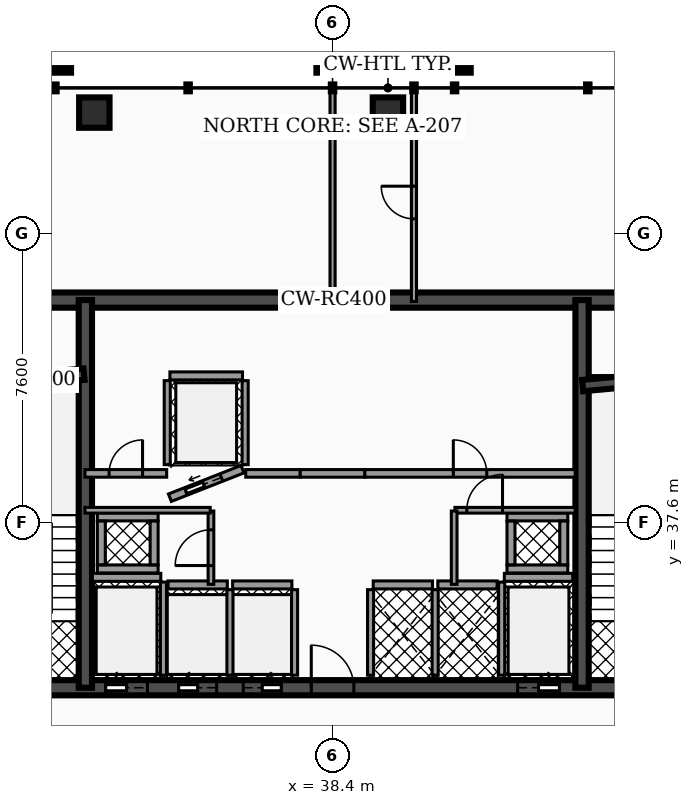
"""IFC4 building model, lengths in metres.
Left out: names, types, materials, properties, quantities, classifications, styles, units other than length and angle.
Written with IfcOpenShell. Run it as: python <this file> out.ifc"""

import sys

from ifc_helpers import new_model, si_unit, direction, frame, frame_2d, origin, origin_2d, place, context, subcontext, project, spatial, rectangle, hollow_rectangle, extrude, element, fill, save


model = new_model("IFC4")
c1 = context("Model", 3, precision=1e-05, world=origin(), true_north=direction((0.0, 1.0)))
c2 = subcontext(c1, "Body", "Model", "MODEL_VIEW")
j1 = project(units=[si_unit("LENGTHUNIT", "METRE"), si_unit("PLANEANGLEUNIT", "RADIAN")], contexts=[c1])
p1 = place(None, origin())
s1 = spatial("IfcSite", under=j1, at=p1, CompositionType="ELEMENT")
p2 = place(p1, origin())
s2 = spatial("IfcBuilding", under=s1, at=p2, CompositionType="ELEMENT")
p3 = place(p2, frame((0.0, 0.0, 153.34)))
s3 = spatial("IfcBuildingStorey", under=s2, at=p3, CompositionType="ELEMENT", Elevation=153.34)
p4 = place(p3, frame((28.4, 43.45, 0.0), z_axis=(0.0, 0.0, 1.0), x_axis=(1.0, 0.0, 0.0)))
e1 = element("IfcWall", 1, at=p4, inside=s3, PredefinedType="SHEAR", context=c2, shape_type="SweptSolid", body=[
    extrude(rectangle(XDim=20.06, YDim=0.4, at=frame_2d((10.03, 0.0))), origin(), (0.0, 0.0, 1.0), 3.5),
])
p5 = place(p3, frame((28.4, 33.25, 0.0), z_axis=(0.0, 0.0, 1.0), x_axis=(1.0, 0.0, 0.0)))
e2 = element("IfcWall", 2, at=p5, inside=s3, PredefinedType="SHEAR", context=c2, shape_type="SweptSolid", body=[
    extrude(rectangle(XDim=20.06, YDim=0.4, at=frame_2d((10.03, 0.0))), origin(), (0.0, 0.0, 1.0), 3.5),
])
p6 = place(p5, frame((4.03, 0.0, 0.0)))
e3 = element("IfcOpeningElement", 3, at=p6, cuts=e2, PredefinedType="OPENING", context=c2, shape_type="SweptSolid", body=[
    extrude(rectangle(XDim=1.1, YDim=2.15, at=frame_2d((0.55, 1.075))), frame((0.0, 0.21, 0.0), z_axis=(0.0, -1.0, 0.0), x_axis=(1.0, 0.0, 0.0)), (0.0, 0.0, 1.0), 0.42),
])
p7 = place(p5, frame((14.87, 0.0, 0.0)))
e4 = element("IfcOpeningElement", 4, at=p7, cuts=e2, PredefinedType="OPENING", context=c2, shape_type="SweptSolid", body=[
    extrude(rectangle(XDim=1.1, YDim=2.15, at=frame_2d((0.55, 1.075))), frame((0.0, 0.21, 0.0), z_axis=(0.0, -1.0, 0.0), x_axis=(1.0, 0.0, 0.0)), (0.0, 0.0, 1.0), 0.42),
])
p8 = place(p5, frame((5.95, 0.0, 0.0)))
e5 = element("IfcOpeningElement", 5, at=p8, cuts=e2, PredefinedType="OPENING", context=c2, shape_type="SweptSolid", body=[
    extrude(rectangle(XDim=1.0, YDim=2.1, at=frame_2d((0.5, 1.05))), frame((0.0, 0.21, 0.0), z_axis=(0.0, -1.0, 0.0), x_axis=(1.0, 0.0, 0.0)), (0.0, 0.0, 1.0), 0.42),
])
p9 = place(p5, frame((7.65, 0.0, 0.0)))
e6 = element("IfcOpeningElement", 6, at=p9, cuts=e2, PredefinedType="OPENING", context=c2, shape_type="SweptSolid", body=[
    extrude(rectangle(XDim=1.0, YDim=2.1, at=frame_2d((0.5, 1.05))), frame((0.0, 0.21, 0.0), z_axis=(0.0, -1.0, 0.0), x_axis=(1.0, 0.0, 0.0)), (0.0, 0.0, 1.0), 0.42),
])
p10 = place(p5, frame((1.31, 0.0, 0.0)))
e7 = element("IfcOpeningElement", 7, at=p10, cuts=e2, PredefinedType="OPENING", context=c2, shape_type="SweptSolid", body=[
    extrude(rectangle(XDim=1.1, YDim=2.2, at=frame_2d((0.55, 1.1))), frame((0.0, 0.21, 0.0), z_axis=(0.0, -1.0, 0.0), x_axis=(1.0, 0.0, 0.0)), (0.0, 0.0, 1.0), 0.42),
])
p11 = place(p5, frame((9.44, 0.0, 0.0)))
e8 = element("IfcOpeningElement", 8, at=p11, cuts=e2, PredefinedType="OPENING", context=c2, shape_type="SweptSolid", body=[
    extrude(rectangle(XDim=1.12, YDim=2.05, at=frame_2d((0.56, 1.025))), frame((0.0, 0.21, 0.0), z_axis=(0.0, -1.0, 0.0), x_axis=(1.0, 0.0, 0.0)), (0.0, 0.0, 1.0), 0.42),
])
p12 = place(p5, frame((17.65, 0.0, 0.0)))
e9 = element("IfcOpeningElement", 9, at=p12, cuts=e2, PredefinedType="OPENING", context=c2, shape_type="SweptSolid", body=[
    extrude(rectangle(XDim=1.1, YDim=2.2, at=frame_2d((0.55, 1.1))), frame((0.0, 0.21, 0.0), z_axis=(0.0, -1.0, 0.0), x_axis=(1.0, 0.0, 0.0)), (0.0, 0.0, 1.0), 0.42),
])
for number, where, z_axis, x_axis in (
    (10, (31.895, 33.25, 0.0), (0.0, 0.0, 1.0), (0.0, 1.0, 0.0)),
    (11, (44.965, 33.25, 0.0), (0.0, 0.0, 1.0), (0.0, 1.0, 0.0)),
):
    element("IfcWall", number, at=place(p3, frame(where, z_axis=z_axis, x_axis=x_axis)), inside=s3, PredefinedType="SHEAR", context=c2, shape_type="SweptSolid", body=[
        extrude(rectangle(XDim=10.2, YDim=0.35, at=frame_2d((5.1, 0.0))), origin(), (0.0, 0.0, 1.0), 3.5),
    ])
p13 = place(p3, frame((28.64, 41.2, 0.0), z_axis=(0.0, 0.0, 1.0), x_axis=(0.995687118776, 0.092774789157, 0.0)))
e12 = element("IfcWall", 12, at=p13, inside=s3, PredefinedType="SHEAR", context=c2, shape_type="SweptSolid", body=[
    extrude(rectangle(XDim=3.234, YDim=0.3, at=frame_2d((1.617, 0.0))), origin(), (0.0, 0.0, 1.0), 3.5),
])
p14 = place(p3, frame((44.98, 41.2, 0.0), z_axis=(0.0, 0.0, 1.0), x_axis=(0.995686468965, 0.09278176286, 0.0)))
e13 = element("IfcWall", 13, at=p14, inside=s3, PredefinedType="SHEAR", context=c2, shape_type="SweptSolid", body=[
    extrude(rectangle(XDim=3.234, YDim=0.3, at=frame_2d((1.617, 0.0))), origin(), (0.0, 0.0, 1.0), 3.5),
])
p15 = place(p3, frame((39.857, 48.383, 0.0), z_axis=(-0.007830290744, -0.033418562283, 0.999410769525), x_axis=(0.973630450451, -0.228130984206, 0.0)))
e14 = element("IfcColumn", 14, at=p15, inside=s3, PredefinedType="COLUMN", context=c2, shape_type="SweptSolid", body=[
    extrude(hollow_rectangle(XDim=0.8, YDim=0.8, WallThickness=0.04, at=origin_2d()), origin(), (0.0, 0.0, 1.0), 3.492),
])
p16 = place(p3, frame((32.131, 48.383, 0.0), z_axis=(-0.073422265468, -0.033329385464, 0.996743860276), x_axis=(0.413346829645, -0.910573664468, 0.0)))
e15 = element("IfcColumn", 15, at=p16, inside=s3, PredefinedType="COLUMN", context=c2, shape_type="SweptSolid", body=[
    extrude(hollow_rectangle(XDim=0.8, YDim=0.8, WallThickness=0.04, at=origin_2d()), origin(), (0.0, 0.0, 1.0), 3.501),
])
p17 = place(p3, frame((32.08, 36.155, 0.0), z_axis=(0.0, 0.0, 1.0), x_axis=(1.0, 0.0, 0.0)))
e16 = element("IfcWall", 16, at=p17, inside=s3, PredefinedType="SOLIDWALL", context=c2, shape_type="SweptSolid", body=[
    extrude(rectangle(XDim=1.8, YDim=0.21, at=frame_2d((0.9, 0.0))), origin(), (0.0, 0.0, 1.0), 2.472),
])
p18 = place(p3, frame((33.95, 33.58, 0.0), z_axis=(0.0, 0.0, 1.0), x_axis=(0.0, 1.0, 0.0)))
e17 = element("IfcWall", 17, at=p18, inside=s3, PredefinedType="SOLIDWALL", context=c2, shape_type="SweptSolid", body=[
    extrude(rectangle(XDim=2.45, YDim=0.16, at=frame_2d((1.225, 0.0))), origin(), (0.0, 0.0, 1.0), 2.472),
])
p19 = place(p3, frame((42.92, 36.155, 0.0), z_axis=(0.0, 0.0, 1.0), x_axis=(1.0, 0.0, 0.0)))
e18 = element("IfcWall", 18, at=p19, inside=s3, PredefinedType="SOLIDWALL", context=c2, shape_type="SweptSolid", body=[
    extrude(rectangle(XDim=1.8, YDim=0.21, at=frame_2d((0.9, 0.0))), origin(), (0.0, 0.0, 1.0), 2.472),
])
p20 = place(p3, frame((42.85, 33.58, 0.0), z_axis=(0.0, 0.0, 1.0), x_axis=(0.0, 1.0, 0.0)))
e19 = element("IfcWall", 19, at=p20, inside=s3, PredefinedType="SOLIDWALL", context=c2, shape_type="SweptSolid", body=[
    extrude(rectangle(XDim=2.45, YDim=0.16, at=frame_2d((1.225, 0.0))), origin(), (0.0, 0.0, 1.0), 2.472),
])
p21 = place(p3, frame((34.07, 35.955, 0.0), z_axis=(0.0, 0.0, 1.0), x_axis=(1.0, 0.0, 0.0)))
e20 = element("IfcWall", 20, at=p21, inside=s3, PredefinedType="SOLIDWALL", context=c2, shape_type="SweptSolid", body=[
    extrude(rectangle(XDim=1.56, YDim=0.21, at=frame_2d((0.78, 0.0))), origin(), (0.0, 0.0, 1.0), 2.472),
])
p22 = place(p3, frame((35.7, 33.58, 0.0), z_axis=(0.0, 0.0, 1.0), x_axis=(0.0, 1.0, 0.0)))
e21 = element("IfcWall", 21, at=p22, inside=s3, PredefinedType="SOLIDWALL", context=c2, shape_type="SweptSolid", body=[
    extrude(rectangle(XDim=2.25, YDim=0.16, at=frame_2d((1.125, 0.0))), origin(), (0.0, 0.0, 1.0), 2.472),
])
p23 = place(p3, frame((35.77, 35.955, 0.0), z_axis=(0.0, 0.0, 1.0), x_axis=(1.0, 0.0, 0.0)))
e22 = element("IfcWall", 22, at=p23, inside=s3, PredefinedType="SOLIDWALL", context=c2, shape_type="SweptSolid", body=[
    extrude(rectangle(XDim=1.56, YDim=0.21, at=frame_2d((0.78, 0.0))), origin(), (0.0, 0.0, 1.0), 2.472),
])
p24 = place(p3, frame((37.4, 33.58, 0.0), z_axis=(0.0, 0.0, 1.0), x_axis=(0.0, 1.0, 0.0)))
e23 = element("IfcWall", 23, at=p24, inside=s3, PredefinedType="SOLIDWALL", context=c2, shape_type="SweptSolid", body=[
    extrude(rectangle(XDim=2.25, YDim=0.16, at=frame_2d((1.125, 0.0))), origin(), (0.0, 0.0, 1.0), 2.472),
])
p25 = place(p3, frame((34.12, 38.25, 0.0), z_axis=(0.0, 0.0, 1.0), x_axis=(0.930804993012, 0.36551616241, 0.0)))
e24 = element("IfcWall", 24, at=p25, inside=s3, PredefinedType="SOLIDWALL", context=c2, shape_type="SweptSolid", body=[
    extrude(rectangle(XDim=2.052, YDim=0.21, at=frame_2d((1.026, 0.0))), origin(), (0.0, 0.0, 1.0), 2.472),
])
p26 = place(p25, frame((0.455, 0.0, 0.0)))
e25 = element("IfcOpeningElement", 25, at=p26, cuts=e24, PredefinedType="OPENING", context=c2, shape_type="SweptSolid", body=[
    extrude(rectangle(XDim=1.0, YDim=2.1, at=frame_2d((0.5, 1.05))), frame((0.0, 0.115, 0.0), z_axis=(0.0, -1.0, 0.0), x_axis=(1.0, 0.0, 0.0)), (0.0, 0.0, 1.0), 0.23),
])
p27 = place(p3, frame((34.12, 41.455, 0.0), z_axis=(0.0, 0.0, 1.0), x_axis=(1.0, 0.0, 0.0)))
e26 = element("IfcWall", 26, at=p27, inside=s3, PredefinedType="SOLIDWALL", context=c2, shape_type="SweptSolid", body=[
    extrude(rectangle(XDim=1.91, YDim=0.21, at=frame_2d((0.955, 0.0))), origin(), (0.0, 0.0, 1.0), 2.472),
])
for number, where, z_axis, x_axis in (
    (27, (34.05, 39.12, 0.0), (0.0, 0.0, 1.0), (0.0, 1.0, 0.0)),
    (28, (36.1, 39.12, 0.0), (0.0, 0.0, 1.0), (0.0, 1.0, 0.0)),
):
    element("IfcWall", number, at=place(p3, frame(where, z_axis=z_axis, x_axis=x_axis)), inside=s3, PredefinedType="SOLIDWALL", context=c2, shape_type="SweptSolid", body=[
        extrude(rectangle(XDim=2.21, YDim=0.16, at=frame_2d((1.105, 0.0))), origin(), (0.0, 0.0, 1.0), 2.472),
    ])
p28 = place(p3, frame((39.47, 35.955, 0.0), z_axis=(0.0, 0.0, 1.0), x_axis=(1.0, 0.0, 0.0)))
e29 = element("IfcWall", 29, at=p28, inside=s3, PredefinedType="SOLIDWALL", context=c2, shape_type="SweptSolid", body=[
    extrude(rectangle(XDim=1.56, YDim=0.21, at=frame_2d((0.78, 0.0))), origin(), (0.0, 0.0, 1.0), 2.472),
])
for number, where, z_axis, x_axis in (
    (30, (39.4, 33.58, 0.0), (0.0, 0.0, 1.0), (0.0, 1.0, 0.0)),
    (31, (41.1, 33.58, 0.0), (0.0, 0.0, 1.0), (0.0, 1.0, 0.0)),
):
    element("IfcWall", number, at=place(p3, frame(where, z_axis=z_axis, x_axis=x_axis)), inside=s3, PredefinedType="SOLIDWALL", context=c2, shape_type="SweptSolid", body=[
        extrude(rectangle(XDim=2.25, YDim=0.16, at=frame_2d((1.125, 0.0))), origin(), (0.0, 0.0, 1.0), 2.472),
    ])
p29 = place(p3, frame((41.17, 35.955, 0.0), z_axis=(0.0, 0.0, 1.0), x_axis=(1.0, 0.0, 0.0)))
e32 = element("IfcWall", 32, at=p29, inside=s3, PredefinedType="SOLIDWALL", context=c2, shape_type="SweptSolid", body=[
    extrude(rectangle(XDim=1.56, YDim=0.21, at=frame_2d((0.78, 0.0))), origin(), (0.0, 0.0, 1.0), 2.472),
])
for number, where, z_axis, x_axis in (
    (33, (32.21, 36.375, 0.0), (0.0, 0.0, 1.0), (1.0, 0.0, 0.0)),
    (34, (32.21, 37.745, 0.0), (0.0, 0.0, 1.0), (1.0, 0.0, 0.0)),
):
    element("IfcWall", number, at=place(p3, frame(where, z_axis=z_axis, x_axis=x_axis)), inside=s3, PredefinedType="SOLIDWALL", context=c2, shape_type="SweptSolid", body=[
        extrude(rectangle(XDim=1.6, YDim=0.21, at=frame_2d((0.8, 0.0))), origin(), (0.0, 0.0, 1.0), 3.5),
    ])
for number, where, z_axis, x_axis in (
    (35, (32.315, 36.485, 0.0), (0.0, 0.0, 1.0), (0.0, 1.0, 0.0)),
    (36, (33.705, 36.485, 0.0), (0.0, 0.0, 1.0), (0.0, 1.0, 0.0)),
):
    element("IfcWall", number, at=place(p3, frame(where, z_axis=z_axis, x_axis=x_axis)), inside=s3, PredefinedType="SOLIDWALL", context=c2, shape_type="SweptSolid", body=[
        extrude(rectangle(XDim=1.15, YDim=0.21, at=frame_2d((0.575, 0.0))), origin(), (0.0, 0.0, 1.0), 3.5),
    ])
for number, where, z_axis, x_axis in (
    (37, (42.99, 36.375, 0.0), (0.0, 0.0, 1.0), (1.0, 0.0, 0.0)),
    (38, (42.99, 37.745, 0.0), (0.0, 0.0, 1.0), (1.0, 0.0, 0.0)),
):
    element("IfcWall", number, at=place(p3, frame(where, z_axis=z_axis, x_axis=x_axis)), inside=s3, PredefinedType="SOLIDWALL", context=c2, shape_type="SweptSolid", body=[
        extrude(rectangle(XDim=1.6, YDim=0.21, at=frame_2d((0.8, 0.0))), origin(), (0.0, 0.0, 1.0), 3.5),
    ])
for number, where, z_axis, x_axis in (
    (39, (43.095, 36.485, 0.0), (0.0, 0.0, 1.0), (0.0, 1.0, 0.0)),
    (40, (44.485, 36.485, 0.0), (0.0, 0.0, 1.0), (0.0, 1.0, 0.0)),
):
    element("IfcWall", number, at=place(p3, frame(where, z_axis=z_axis, x_axis=x_axis)), inside=s3, PredefinedType="SOLIDWALL", context=c2, shape_type="SweptSolid", body=[
        extrude(rectangle(XDim=1.15, YDim=0.21, at=frame_2d((0.575, 0.0))), origin(), (0.0, 0.0, 1.0), 3.5),
    ])
p30 = place(p3, frame((35.2, 35.97, 0.0), z_axis=(0.0, 0.0, 1.0), x_axis=(0.0, 1.0, 0.0)))
e41 = element("IfcWall", 41, at=p30, inside=s3, PredefinedType="PARTITIONING", context=c2, shape_type="SweptSolid", body=[
    extrude(rectangle(XDim=1.93, YDim=0.15, at=frame_2d((0.965, 0.0))), origin(), (0.0, 0.0, 1.0), 2.447),
])
p31 = place(p30, frame((0.495, 0.0, 0.0)))
e42 = element("IfcOpeningElement", 42, at=p31, cuts=e41, PredefinedType="OPENING", context=c2, shape_type="SweptSolid", body=[
    extrude(rectangle(XDim=0.94, YDim=2.05, at=frame_2d((0.47, 1.025))), frame((0.0, 0.085, 0.0), z_axis=(0.0, -1.0, 0.0), x_axis=(1.0, 0.0, 0.0)), (0.0, 0.0, 1.0), 0.17),
])
p32 = place(p3, frame((31.885, 37.92, 0.0), z_axis=(0.0, 0.0, 1.0), x_axis=(1.0, 0.0, 0.0)))
e43 = element("IfcWall", 43, at=p32, inside=s3, PredefinedType="PARTITIONING", context=c2, shape_type="SweptSolid", body=[
    extrude(rectangle(XDim=3.295, YDim=0.15, at=frame_2d((1.647, 0.0))), origin(), (0.0, 0.0, 1.0), 2.447),
])
p33 = place(p3, frame((31.885, 38.89, 0.0), z_axis=(0.0, 0.0, 1.0), x_axis=(1.0, 0.0, 0.0)))
e44 = element("IfcWall", 44, at=p33, inside=s3, PredefinedType="PARTITIONING", context=c2, shape_type="SweptSolid", body=[
    extrude(rectangle(XDim=2.15, YDim=0.2, at=frame_2d((1.075, 0.0))), origin(), (0.0, 0.0, 1.0), 2.447),
])
p34 = place(p33, frame((0.635, 0.0, 0.0)))
e45 = element("IfcOpeningElement", 45, at=p34, cuts=e44, PredefinedType="OPENING", context=c2, shape_type="SweptSolid", body=[
    extrude(rectangle(XDim=0.88, YDim=2.05, at=frame_2d((0.44, 1.025))), frame((0.0, 0.11, 0.0), z_axis=(0.0, -1.0, 0.0), x_axis=(1.0, 0.0, 0.0)), (0.0, 0.0, 1.0), 0.22),
])
p35 = place(p3, frame((36.115, 38.89, 0.0), z_axis=(0.0, 0.0, 1.0), x_axis=(1.0, 0.0, 0.0)))
e46 = element("IfcWall", 46, at=p35, inside=s3, PredefinedType="PARTITIONING", context=c2, shape_type="SweptSolid", body=[
    extrude(rectangle(XDim=1.435, YDim=0.2, at=frame_2d((0.718, 0.0))), origin(), (0.0, 0.0, 1.0), 2.447),
])
p36 = place(p3, frame((37.55, 38.89, 0.0), z_axis=(0.0, 0.0, 1.0), x_axis=(1.0, 0.0, 0.0)))
e47 = element("IfcWall", 47, at=p36, inside=s3, PredefinedType="PARTITIONING", context=c2, shape_type="SweptSolid", body=[
    extrude(rectangle(XDim=1.7, YDim=0.2, at=frame_2d((0.85, 0.0))), origin(), (0.0, 0.0, 1.0), 2.447),
])
p37 = place(p3, frame((39.25, 38.89, 0.0), z_axis=(0.0, 0.0, 1.0), x_axis=(1.0, 0.0, 0.0)))
e48 = element("IfcWall", 48, at=p37, inside=s3, PredefinedType="PARTITIONING", context=c2, shape_type="SweptSolid", body=[
    extrude(rectangle(XDim=5.535, YDim=0.2, at=frame_2d((2.768, 0.0))), origin(), (0.0, 0.0, 1.0), 2.447),
])
p38 = place(p37, frame((2.327, 0.0, 0.0)))
e49 = element("IfcOpeningElement", 49, at=p38, cuts=e48, PredefinedType="OPENING", context=c2, shape_type="SweptSolid", body=[
    extrude(rectangle(XDim=0.88, YDim=2.05, at=frame_2d((0.44, 1.025))), frame((0.0, 0.11, 0.0), z_axis=(0.0, -1.0, 0.0), x_axis=(1.0, 0.0, 0.0)), (0.0, 0.0, 1.0), 0.22),
])
p39 = place(p3, frame((41.62, 37.92, 0.0), z_axis=(0.0, 0.0, 1.0), x_axis=(1.0, 0.0, 0.0)))
e50 = element("IfcWall", 50, at=p39, inside=s3, PredefinedType="PARTITIONING", context=c2, shape_type="SweptSolid", body=[
    extrude(rectangle(XDim=3.165, YDim=0.15, at=frame_2d((1.583, 0.0))), origin(), (0.0, 0.0, 1.0), 2.447),
])
p40 = place(p39, frame((0.312, 0.0, 0.0)))
e51 = element("IfcOpeningElement", 51, at=p40, cuts=e50, PredefinedType="OPENING", context=c2, shape_type="SweptSolid", body=[
    extrude(rectangle(XDim=0.94, YDim=2.05, at=frame_2d((0.47, 1.025))), frame((0.0, 0.085, 0.0), z_axis=(0.0, -1.0, 0.0), x_axis=(1.0, 0.0, 0.0)), (0.0, 0.0, 1.0), 0.17),
])
p41 = place(p3, frame((41.6, 35.97, 0.0), z_axis=(0.0, 0.0, 1.0), x_axis=(0.0, 1.0, 0.0)))
e52 = element("IfcWall", 52, at=p41, inside=s3, PredefinedType="PARTITIONING", context=c2, shape_type="SweptSolid", body=[
    extrude(rectangle(XDim=1.93, YDim=0.15, at=frame_2d((0.965, 0.0))), origin(), (0.0, 0.0, 1.0), 2.447),
])
p42 = place(p3, frame((38.4, 43.415, 0.0), z_axis=(0.0, 0.0, 1.0), x_axis=(0.0, 1.0, 0.0)))
e53 = element("IfcWall", 53, at=p42, inside=s3, PredefinedType="PARTITIONING", context=c2, shape_type="SweptSolid", body=[
    extrude(rectangle(XDim=5.603, YDim=0.135, at=frame_2d((2.802, 0.0))), origin(), (0.0, 0.0, 1.0), 2.447),
])
p43 = place(p3, frame((40.542, 43.415, 0.0), z_axis=(0.0, 0.0, 1.0), x_axis=(0.0, 1.0, 0.0)))
e54 = element("IfcWall", 54, at=p43, inside=s3, PredefinedType="PARTITIONING", context=c2, shape_type="SweptSolid", body=[
    extrude(rectangle(XDim=5.603, YDim=0.135, at=frame_2d((2.802, 0.0))), origin(), (0.0, 0.0, 1.0), 2.447),
])
p44 = place(p43, frame((2.172, 0.0, 0.0)))
e55 = element("IfcOpeningElement", 55, at=p44, cuts=e54, PredefinedType="OPENING", context=c2, shape_type="SweptSolid", body=[
    extrude(rectangle(XDim=0.86, YDim=2.05, at=frame_2d((0.43, 1.025))), frame((0.0, 0.077, 0.0), z_axis=(0.0, -1.0, 0.0), x_axis=(1.0, 0.0, 0.0)), (0.0, 0.0, 1.0), 0.155),
])
p45 = place(p6, origin())
e56 = element("IfcDoor", 56, at=p45, inside=s3, OperationType="SLIDING_TO_LEFT", PredefinedType="DOOR", context=c2, shape_type="SweptSolid", body=[
    extrude(rectangle(XDim=1.1, YDim=2.15, at=frame_2d((0.55, 1.075))), frame((0.0, 0.025, 0.0), z_axis=(0.0, -1.0, 0.0), x_axis=(1.0, 0.0, 0.0)), (0.0, 0.0, 1.0), 0.05),
])
fill(e3, e56)
p46 = place(p7, origin())
e57 = element("IfcDoor", 57, at=p46, inside=s3, OperationType="SLIDING_TO_RIGHT", PredefinedType="DOOR", context=c2, shape_type="SweptSolid", body=[
    extrude(rectangle(XDim=1.1, YDim=2.15, at=frame_2d((0.55, 1.075))), frame((0.0, 0.025, 0.0), z_axis=(0.0, -1.0, 0.0), x_axis=(1.0, 0.0, 0.0)), (0.0, 0.0, 1.0), 0.05),
])
fill(e4, e57)
p47 = place(p8, origin())
e58 = element("IfcDoor", 58, at=p47, inside=s3, OperationType="SLIDING_TO_LEFT", PredefinedType="DOOR", context=c2, shape_type="SweptSolid", body=[
    extrude(rectangle(XDim=1.0, YDim=2.1, at=frame_2d((0.5, 1.05))), frame((0.0, 0.025, 0.0), z_axis=(0.0, -1.0, 0.0), x_axis=(1.0, 0.0, 0.0)), (0.0, 0.0, 1.0), 0.05),
])
fill(e5, e58)
p48 = place(p9, origin())
e59 = element("IfcDoor", 59, at=p48, inside=s3, OperationType="SLIDING_TO_RIGHT", PredefinedType="DOOR", context=c2, shape_type="SweptSolid", body=[
    extrude(rectangle(XDim=1.0, YDim=2.1, at=frame_2d((0.5, 1.05))), frame((0.0, 0.025, 0.0), z_axis=(0.0, -1.0, 0.0), x_axis=(1.0, 0.0, 0.0)), (0.0, 0.0, 1.0), 0.05),
])
fill(e6, e59)
p49 = place(p26, origin())
e60 = element("IfcDoor", 60, at=p49, inside=s3, OperationType="SLIDING_TO_LEFT", PredefinedType="DOOR", context=c2, shape_type="SweptSolid", body=[
    extrude(rectangle(XDim=1.0, YDim=2.1, at=frame_2d((0.5, 1.05))), frame((0.0, 0.025, 0.0), z_axis=(0.0, -1.0, 0.0), x_axis=(1.0, 0.0, 0.0)), (0.0, 0.0, 1.0), 0.05),
])
fill(e25, e60)
p50 = place(p11, origin())
e61 = element("IfcDoor", 61, at=p50, inside=s3, OperationType="SINGLE_SWING_LEFT", PredefinedType="DOOR", context=c2, shape_type="SweptSolid", body=[
    extrude(rectangle(XDim=1.12, YDim=2.05, at=frame_2d((0.56, 1.025))), frame((0.0, 0.025, 0.0), z_axis=(0.0, -1.0, 0.0), x_axis=(1.0, 0.0, 0.0)), (0.0, 0.0, 1.0), 0.05),
])
fill(e8, e61)
p51 = place(p31, origin())
e62 = element("IfcDoor", 62, at=p51, inside=s3, OperationType="SINGLE_SWING_LEFT", PredefinedType="DOOR", context=c2, shape_type="SweptSolid", body=[
    extrude(rectangle(XDim=0.94, YDim=2.05, at=frame_2d((0.47, 1.025))), frame((0.0, 0.025, 0.0), z_axis=(0.0, -1.0, 0.0), x_axis=(1.0, 0.0, 0.0)), (0.0, 0.0, 1.0), 0.05),
])
fill(e42, e62)
p52 = place(p34, origin())
e63 = element("IfcDoor", 63, at=p52, inside=s3, OperationType="SINGLE_SWING_RIGHT", PredefinedType="DOOR", context=c2, shape_type="SweptSolid", body=[
    extrude(rectangle(XDim=0.88, YDim=2.05, at=frame_2d((0.44, 1.025))), frame((0.0, 0.025, 0.0), z_axis=(0.0, -1.0, 0.0), x_axis=(1.0, 0.0, 0.0)), (0.0, 0.0, 1.0), 0.05),
])
fill(e45, e63)
p53 = place(p38, origin())
e64 = element("IfcDoor", 64, at=p53, inside=s3, OperationType="SINGLE_SWING_LEFT", PredefinedType="DOOR", context=c2, shape_type="SweptSolid", body=[
    extrude(rectangle(XDim=0.88, YDim=2.05, at=frame_2d((0.44, 1.025))), frame((0.0, 0.025, 0.0), z_axis=(0.0, -1.0, 0.0), x_axis=(1.0, 0.0, 0.0)), (0.0, 0.0, 1.0), 0.05),
])
fill(e49, e64)
p54 = place(p40, origin())
e65 = element("IfcDoor", 65, at=p54, inside=s3, OperationType="SINGLE_SWING_RIGHT", PredefinedType="DOOR", context=c2, shape_type="SweptSolid", body=[
    extrude(rectangle(XDim=0.94, YDim=2.05, at=frame_2d((0.47, 1.025))), frame((0.0, 0.025, 0.0), z_axis=(0.0, -1.0, 0.0), x_axis=(1.0, 0.0, 0.0)), (0.0, 0.0, 1.0), 0.05),
])
fill(e51, e65)
p55 = place(p44, origin())
e66 = element("IfcDoor", 66, at=p55, inside=s3, OperationType="SINGLE_SWING_RIGHT", PredefinedType="DOOR", context=c2, shape_type="SweptSolid", body=[
    extrude(rectangle(XDim=0.86, YDim=2.05, at=frame_2d((0.43, 1.025))), frame((0.0, 0.025, 0.0), z_axis=(0.0, -1.0, 0.0), x_axis=(1.0, 0.0, 0.0)), (0.0, 0.0, 1.0), 0.05),
])
fill(e55, e66)
save(model, sys.argv[1])
